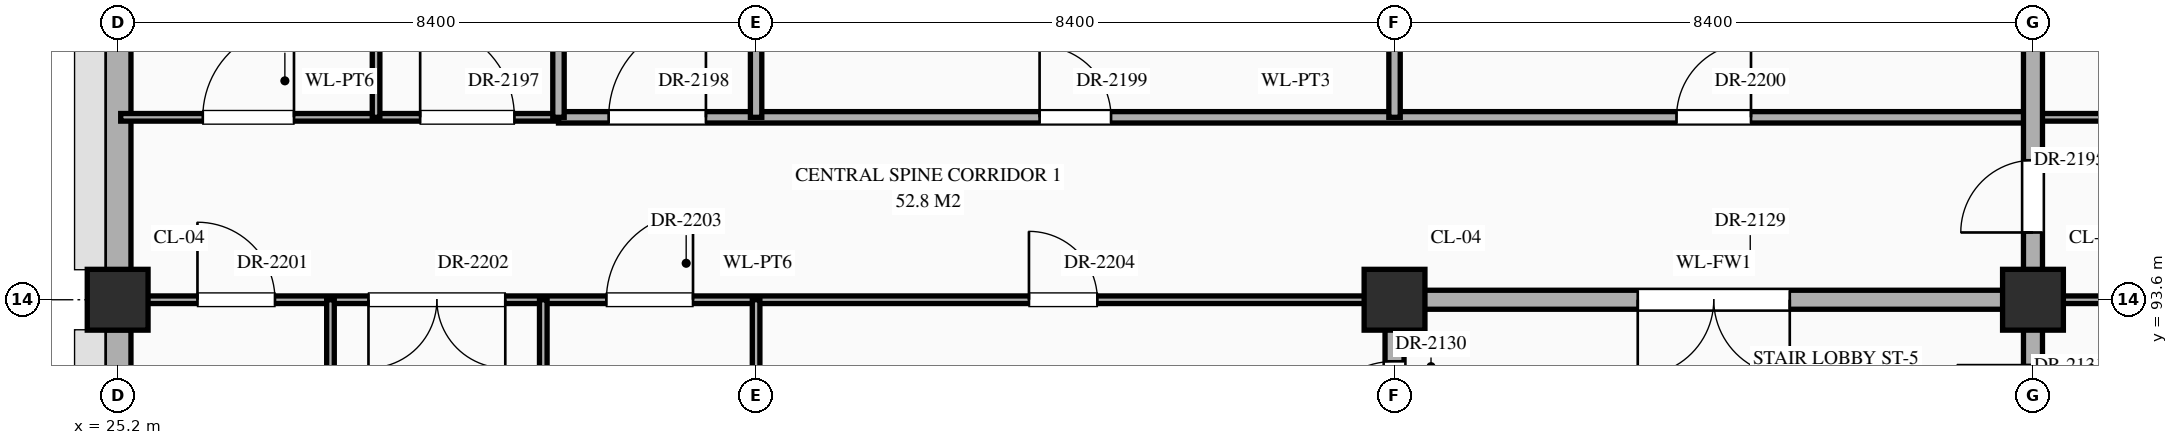
"""IFC4 building model, lengths in metres.
Left out: names, types, materials, properties, quantities, classifications, styles, units other than length and angle.
Written with IfcOpenShell. Run it as: python <this file> out.ifc"""

import sys

from ifc_helpers import new_model, si_unit, direction, frame, frame_2d, origin, origin_2d, place, context, subcontext, project, spatial, rectangle, extrude, element, fill, save


model = new_model("IFC4")
c1 = context("Model", 3, precision=1e-05, world=origin(), true_north=direction((0.0, 1.0)))
c2 = subcontext(c1, "Body", "Model", "MODEL_VIEW")
j1 = project(units=[si_unit("LENGTHUNIT", "METRE"), si_unit("PLANEANGLEUNIT", "RADIAN")], contexts=[c1])
p1 = place(None, origin())
s1 = spatial("IfcSite", under=j1, at=p1, CompositionType="ELEMENT")
p2 = place(p1, origin())
s2 = spatial("IfcBuilding", under=s1, at=p2, CompositionType="ELEMENT")
p3 = place(p2, frame((0.0, 0.0, 26.1)))
s3 = spatial("IfcBuildingStorey", under=s2, at=p3, CompositionType="ELEMENT", Elevation=26.1)
for number, where, z_axis, x_axis in (
    (1, (25.2, 93.6, 0.0), (0.0, 0.0, 1.0), (1.0, 0.0, 0.0)),
    (2, (42.0, 93.6, 0.0), (0.0, 0.0, 1.0), (1.0, 0.0, 0.0)),
    (3, (50.4, 93.6, 0.0), (0.0, 0.0, 1.0), (1.0, 0.0, 0.0)),
):
    element("IfcColumn", number, at=place(p3, frame(where, z_axis=z_axis, x_axis=x_axis)), inside=s3, PredefinedType="COLUMN", context=c2, shape_type="SweptSolid", body=[
        extrude(rectangle(XDim=0.8, YDim=0.8, at=origin_2d()), origin(), (0.0, 0.0, 1.0), 4.5),
    ])
p4 = place(p3, frame((25.2, 86.795, 0.0), z_axis=(0.0, 0.0, 1.0), x_axis=(0.0, 1.0, 0.0)))
e4 = element("IfcWall", 4, at=p4, inside=s3, PredefinedType="STANDARD", context=c2, shape_type="SweptSolid", body=[
    extrude(rectangle(XDim=6.41, YDim=0.35, at=frame_2d((3.205, 0.0))), origin(), (0.0, 0.0, 1.0), 3.59),
])
p5 = place(p4, frame((2.68, 0.0, 0.85)))
e5 = element("IfcOpeningElement", 5, at=p5, cuts=e4, PredefinedType="OPENING", context=c2, shape_type="SweptSolid", body=[
    extrude(rectangle(XDim=1.05, YDim=1.38, at=frame_2d((0.525, 0.69))), frame((0.0, 0.187, 0.0), z_axis=(0.0, -1.0, 0.0), x_axis=(1.0, 0.0, 0.0)), (0.0, 0.0, 1.0), 0.374),
])
p6 = place(p3, frame((25.2, 93.995, 0.0), z_axis=(0.0, 0.0, 1.0), x_axis=(0.0, 1.0, 0.0)))
e6 = element("IfcWall", 6, at=p6, inside=s3, PredefinedType="STANDARD", context=c2, shape_type="SweptSolid", body=[
    extrude(rectangle(XDim=6.41, YDim=0.35, at=frame_2d((3.205, 0.0))), origin(), (0.0, 0.0, 1.0), 3.59),
])
p7 = place(p6, frame((3.83, 0.0, 0.85)))
e7 = element("IfcOpeningElement", 7, at=p7, cuts=e6, PredefinedType="OPENING", context=c2, shape_type="SweptSolid", body=[
    extrude(rectangle(XDim=1.35, YDim=1.56, at=frame_2d((0.675, 0.78))), frame((0.0, 0.187, 0.0), z_axis=(0.0, -1.0, 0.0), x_axis=(1.0, 0.0, 0.0)), (0.0, 0.0, 1.0), 0.374),
])
p8 = place(p3, frame((25.24, 93.6, 0.0), z_axis=(0.0, 0.0, 1.0), x_axis=(1.0, 0.0, 0.0)))
e8 = element("IfcWall", 8, at=p8, inside=s3, PredefinedType="STANDARD", context=c2, shape_type="SweptSolid", body=[
    extrude(rectangle(XDim=16.76, YDim=0.1, at=frame_2d((8.38, 0.0))), origin(), (0.0, 0.0, 1.0), 3.19),
])
p9 = place(p8, frame((1.01, 0.0, 0.0)))
e9 = element("IfcOpeningElement", 9, at=p9, cuts=e8, PredefinedType="OPENING", context=c2, shape_type="SweptSolid", body=[
    extrude(rectangle(XDim=1.02, YDim=2.4, at=frame_2d((0.51, 1.2))), frame((0.0, 0.062, 0.0), z_axis=(0.0, -1.0, 0.0), x_axis=(1.0, 0.0, 0.0)), (0.0, 0.0, 1.0), 0.124),
])
p10 = place(p8, frame((3.26, 0.0, 0.0)))
e10 = element("IfcOpeningElement", 10, at=p10, cuts=e8, PredefinedType="OPENING", context=c2, shape_type="SweptSolid", body=[
    extrude(rectangle(XDim=1.8, YDim=2.5, at=frame_2d((0.9, 1.25))), frame((0.0, 0.062, 0.0), z_axis=(0.0, -1.0, 0.0), x_axis=(1.0, 0.0, 0.0)), (0.0, 0.0, 1.0), 0.124),
])
p11 = place(p8, frame((6.39, 0.0, 0.0)))
e11 = element("IfcOpeningElement", 11, at=p11, cuts=e8, PredefinedType="OPENING", context=c2, shape_type="SweptSolid", body=[
    extrude(rectangle(XDim=1.14, YDim=2.4, at=frame_2d((0.57, 1.2))), frame((0.0, 0.062, 0.0), z_axis=(0.0, -1.0, 0.0), x_axis=(1.0, 0.0, 0.0)), (0.0, 0.0, 1.0), 0.124),
])
p12 = place(p8, frame((11.95, 0.0, 0.0)))
e12 = element("IfcOpeningElement", 12, at=p12, cuts=e8, PredefinedType="OPENING", context=c2, shape_type="SweptSolid", body=[
    extrude(rectangle(XDim=0.9, YDim=2.15, at=frame_2d((0.45, 1.075))), frame((0.0, 0.062, 0.0), z_axis=(0.0, -1.0, 0.0), x_axis=(1.0, 0.0, 0.0)), (0.0, 0.0, 1.0), 0.124),
])
p13 = place(p3, frame((42.0, 93.6, 0.0), z_axis=(0.0, 0.0, 1.0), x_axis=(1.0, 0.0, 0.0)))
e13 = element("IfcWall", 13, at=p13, inside=s3, PredefinedType="STANDARD", context=c2, shape_type="SweptSolid", body=[
    extrude(rectangle(XDim=8.4, YDim=0.25, at=frame_2d((4.2, 0.0))), origin(), (0.0, 0.0, 1.0), 3.39),
])
p14 = place(p13, frame((3.2, 0.0, 0.0)))
e14 = element("IfcOpeningElement", 14, at=p14, cuts=e13, PredefinedType="OPENING", context=c2, shape_type="SweptSolid", body=[
    extrude(rectangle(XDim=2.0, YDim=2.4, at=frame_2d((1.0, 1.2))), frame((0.0, 0.137, 0.0), z_axis=(0.0, -1.0, 0.0), x_axis=(1.0, 0.0, 0.0)), (0.0, 0.0, 1.0), 0.274),
])
p15 = place(p3, frame((50.4, 93.6, 0.0), z_axis=(0.0, 0.0, 1.0), x_axis=(1.0, 0.0, 0.0)))
e15 = element("IfcWall", 15, at=p15, inside=s3, PredefinedType="STANDARD", context=c2, shape_type="SweptSolid", body=[
    extrude(rectangle(XDim=8.4, YDim=0.1, at=frame_2d((4.2, 0.0))), origin(), (0.0, 0.0, 1.0), 3.39),
])
p16 = place(p15, frame((0.98, 0.0, 0.0)))
e16 = element("IfcOpeningElement", 16, at=p16, cuts=e15, PredefinedType="OPENING", context=c2, shape_type="SweptSolid", body=[
    extrude(rectangle(XDim=1.16, YDim=2.3, at=frame_2d((0.58, 1.15))), frame((0.0, 0.062, 0.0), z_axis=(0.0, -1.0, 0.0), x_axis=(1.0, 0.0, 0.0)), (0.0, 0.0, 1.0), 0.124),
])
p17 = place(p15, frame((3.6, 0.0, 0.0)))
e17 = element("IfcOpeningElement", 17, at=p17, cuts=e15, PredefinedType="OPENING", context=c2, shape_type="SweptSolid", body=[
    extrude(rectangle(XDim=1.2, YDim=2.35, at=frame_2d((0.6, 1.175))), frame((0.0, 0.062, 0.0), z_axis=(0.0, -1.0, 0.0), x_axis=(1.0, 0.0, 0.0)), (0.0, 0.0, 1.0), 0.124),
])
p18 = place(p15, frame((6.22, 0.0, 0.0)))
e18 = element("IfcOpeningElement", 18, at=p18, cuts=e15, PredefinedType="OPENING", context=c2, shape_type="SweptSolid", body=[
    extrude(rectangle(XDim=1.24, YDim=2.3, at=frame_2d((0.62, 1.15))), frame((0.0, 0.062, 0.0), z_axis=(0.0, -1.0, 0.0), x_axis=(1.0, 0.0, 0.0)), (0.0, 0.0, 1.0), 0.124),
])
p19 = place(p3, frame((25.24, 96.0, 0.0), z_axis=(0.0, 0.0, 1.0), x_axis=(1.0, 0.0, 0.0)))
e19 = element("IfcWall", 19, at=p19, inside=s3, PredefinedType="STANDARD", context=c2, shape_type="SweptSolid", body=[
    extrude(rectangle(XDim=5.76, YDim=0.1, at=frame_2d((2.88, 0.0))), origin(), (0.0, 0.0, 1.0), 4.24),
])
p20 = place(p19, frame((1.08, 0.0, 0.0)))
e20 = element("IfcOpeningElement", 20, at=p20, cuts=e19, PredefinedType="OPENING", context=c2, shape_type="SweptSolid", body=[
    extrude(rectangle(XDim=1.2, YDim=2.35, at=frame_2d((0.6, 1.175))), frame((0.0, 0.062, 0.0), z_axis=(0.0, -1.0, 0.0), x_axis=(1.0, 0.0, 0.0)), (0.0, 0.0, 1.0), 0.124),
])
p21 = place(p19, frame((3.94, 0.0, 0.0)))
e21 = element("IfcOpeningElement", 21, at=p21, cuts=e19, PredefinedType="OPENING", context=c2, shape_type="SweptSolid", body=[
    extrude(rectangle(XDim=1.24, YDim=2.3, at=frame_2d((0.62, 1.15))), frame((0.0, 0.062, 0.0), z_axis=(0.0, -1.0, 0.0), x_axis=(1.0, 0.0, 0.0)), (0.0, 0.0, 1.0), 0.124),
])
p22 = place(p3, frame((31.0, 96.0, 0.0), z_axis=(0.0, 0.0, 1.0), x_axis=(1.0, 0.0, 0.0)))
e22 = element("IfcWall", 22, at=p22, inside=s3, PredefinedType="STANDARD", context=c2, shape_type="SweptSolid", body=[
    extrude(rectangle(XDim=19.4, YDim=0.15, at=frame_2d((9.7, 0.0))), origin(), (0.0, 0.0, 1.0), 4.24),
])
p23 = place(p22, frame((0.66, 0.0, 0.0)))
e23 = element("IfcOpeningElement", 23, at=p23, cuts=e22, PredefinedType="OPENING", context=c2, shape_type="SweptSolid", body=[
    extrude(rectangle(XDim=1.28, YDim=2.35, at=frame_2d((0.64, 1.175))), frame((0.0, 0.087, 0.0), z_axis=(0.0, -1.0, 0.0), x_axis=(1.0, 0.0, 0.0)), (0.0, 0.0, 1.0), 0.174),
])
p24 = place(p22, frame((6.33, 0.0, 0.0)))
e24 = element("IfcOpeningElement", 24, at=p24, cuts=e22, PredefinedType="OPENING", context=c2, shape_type="SweptSolid", body=[
    extrude(rectangle(XDim=0.94, YDim=2.3, at=frame_2d((0.47, 1.15))), frame((0.0, 0.087, 0.0), z_axis=(0.0, -1.0, 0.0), x_axis=(1.0, 0.0, 0.0)), (0.0, 0.0, 1.0), 0.174),
])
p25 = place(p22, frame((14.71, 0.0, 0.0)))
e25 = element("IfcOpeningElement", 25, at=p25, cuts=e22, PredefinedType="OPENING", context=c2, shape_type="SweptSolid", body=[
    extrude(rectangle(XDim=0.98, YDim=2.35, at=frame_2d((0.49, 1.175))), frame((0.0, 0.087, 0.0), z_axis=(0.0, -1.0, 0.0), x_axis=(1.0, 0.0, 0.0)), (0.0, 0.0, 1.0), 0.174),
])
p26 = place(p3, frame((50.4, 96.0, 0.0), z_axis=(0.0, 0.0, 1.0), x_axis=(1.0, 0.0, 0.0)))
e26 = element("IfcWall", 26, at=p26, inside=s3, PredefinedType="STANDARD", context=c2, shape_type="SweptSolid", body=[
    extrude(rectangle(XDim=5.8, YDim=0.1, at=frame_2d((2.9, 0.0))), origin(), (0.0, 0.0, 1.0), 4.24),
])
p27 = place(p26, frame((1.24, 0.0, 0.0)))
e27 = element("IfcOpeningElement", 27, at=p27, cuts=e26, PredefinedType="OPENING", context=c2, shape_type="SweptSolid", body=[
    extrude(rectangle(XDim=0.92, YDim=2.15, at=frame_2d((0.46, 1.075))), frame((0.0, 0.062, 0.0), z_axis=(0.0, -1.0, 0.0), x_axis=(1.0, 0.0, 0.0)), (0.0, 0.0, 1.0), 0.124),
])
p28 = place(p26, frame((4.12, 0.0, 0.0)))
e28 = element("IfcOpeningElement", 28, at=p28, cuts=e26, PredefinedType="OPENING", context=c2, shape_type="SweptSolid", body=[
    extrude(rectangle(XDim=0.96, YDim=2.2, at=frame_2d((0.48, 1.1))), frame((0.0, 0.062, 0.0), z_axis=(0.0, -1.0, 0.0), x_axis=(1.0, 0.0, 0.0)), (0.0, 0.0, 1.0), 0.124),
])
p29 = place(p3, frame((28.0, 86.4, 0.0), z_axis=(0.0, 0.0, 1.0), x_axis=(0.0, 1.0, 0.0)))
e29 = element("IfcWall", 29, at=p29, inside=s3, PredefinedType="STANDARD", context=c2, shape_type="SweptSolid", body=[
    extrude(rectangle(XDim=7.2, YDim=0.1, at=frame_2d((3.6, 0.0))), origin(), (0.0, 0.0, 1.0), 4.24),
])
p30 = place(p29, frame((2.96, 0.0, 0.0)))
e30 = element("IfcOpeningElement", 30, at=p30, cuts=e29, PredefinedType="OPENING", context=c2, shape_type="SweptSolid", body=[
    extrude(rectangle(XDim=1.28, YDim=2.35, at=frame_2d((0.64, 1.175))), frame((0.0, 0.062, 0.0), z_axis=(0.0, -1.0, 0.0), x_axis=(1.0, 0.0, 0.0)), (0.0, 0.0, 1.0), 0.124),
])
p31 = place(p3, frame((28.6, 96.0, 0.0), z_axis=(0.0, 0.0, 1.0), x_axis=(0.0, 1.0, 0.0)))
e31 = element("IfcWall", 31, at=p31, inside=s3, PredefinedType="STANDARD", context=c2, shape_type="SweptSolid", body=[
    extrude(rectangle(XDim=4.8, YDim=0.1, at=frame_2d((2.4, 0.0))), origin(), (0.0, 0.0, 1.0), 4.24),
])
p32 = place(p31, frame((1.97, 0.0, 0.0)))
e32 = element("IfcOpeningElement", 32, at=p32, cuts=e31, PredefinedType="OPENING", context=c2, shape_type="SweptSolid", body=[
    extrude(rectangle(XDim=0.86, YDim=2.1, at=frame_2d((0.43, 1.05))), frame((0.0, 0.062, 0.0), z_axis=(0.0, -1.0, 0.0), x_axis=(1.0, 0.0, 0.0)), (0.0, 0.0, 1.0), 0.124),
])
p33 = place(p3, frame((30.8, 86.4, 0.0), z_axis=(0.0, 0.0, 1.0), x_axis=(0.0, 1.0, 0.0)))
e33 = element("IfcWall", 33, at=p33, inside=s3, PredefinedType="STANDARD", context=c2, shape_type="SweptSolid", body=[
    extrude(rectangle(XDim=7.2, YDim=0.1, at=frame_2d((3.6, 0.0))), origin(), (0.0, 0.0, 1.0), 4.24),
])
p34 = place(p33, frame((3.11, 0.0, 0.0)))
e34 = element("IfcOpeningElement", 34, at=p34, cuts=e33, PredefinedType="OPENING", context=c2, shape_type="SweptSolid", body=[
    extrude(rectangle(XDim=0.98, YDim=2.35, at=frame_2d((0.49, 1.175))), frame((0.0, 0.062, 0.0), z_axis=(0.0, -1.0, 0.0), x_axis=(1.0, 0.0, 0.0)), (0.0, 0.0, 1.0), 0.124),
])
p35 = place(p3, frame((31.0, 96.0, 0.0), z_axis=(0.0, 0.0, 1.0), x_axis=(0.0, 1.0, 0.0)))
e35 = element("IfcWall", 35, at=p35, inside=s3, PredefinedType="STANDARD", context=c2, shape_type="SweptSolid", body=[
    extrude(rectangle(XDim=4.8, YDim=0.15, at=frame_2d((2.4, 0.0))), origin(), (0.0, 0.0, 1.0), 4.24),
])
p36 = place(p35, frame((1.94, 0.0, 0.0)))
e36 = element("IfcOpeningElement", 36, at=p36, cuts=e35, PredefinedType="OPENING", context=c2, shape_type="SweptSolid", body=[
    extrude(rectangle(XDim=0.92, YDim=2.15, at=frame_2d((0.46, 1.075))), frame((0.0, 0.087, 0.0), z_axis=(0.0, -1.0, 0.0), x_axis=(1.0, 0.0, 0.0)), (0.0, 0.0, 1.0), 0.174),
])
p37 = place(p3, frame((33.6, 86.4, 0.0), z_axis=(0.0, 0.0, 1.0), x_axis=(0.0, 1.0, 0.0)))
e37 = element("IfcWall", 37, at=p37, inside=s3, PredefinedType="STANDARD", context=c2, shape_type="SweptSolid", body=[
    extrude(rectangle(XDim=7.2, YDim=0.1, at=frame_2d((3.6, 0.0))), origin(), (0.0, 0.0, 1.0), 4.24),
])
p38 = place(p3, frame((33.6, 96.0, 0.0), z_axis=(0.0, 0.0, 1.0), x_axis=(0.0, 1.0, 0.0)))
e38 = element("IfcWall", 38, at=p38, inside=s3, PredefinedType="STANDARD", context=c2, shape_type="SweptSolid", body=[
    extrude(rectangle(XDim=4.8, YDim=0.15, at=frame_2d((2.4, 0.0))), origin(), (0.0, 0.0, 1.0), 4.24),
])
p39 = place(p3, frame((42.0, 91.2, 0.0), z_axis=(0.0, 0.0, 1.0), x_axis=(0.0, 1.0, 0.0)))
e39 = element("IfcWall", 39, at=p39, inside=s3, PredefinedType="STANDARD", context=c2, shape_type="SweptSolid", body=[
    extrude(rectangle(XDim=2.4, YDim=0.25, at=frame_2d((1.2, 0.0))), origin(), (0.0, 0.0, 1.0), 3.49),
])
p40 = place(p39, frame((0.49, 0.0, 0.0)))
e40 = element("IfcOpeningElement", 40, at=p40, cuts=e39, PredefinedType="OPENING", context=c2, shape_type="SweptSolid", body=[
    extrude(rectangle(XDim=1.1, YDim=2.2, at=frame_2d((0.55, 1.1))), frame((0.0, 0.137, 0.0), z_axis=(0.0, -1.0, 0.0), x_axis=(1.0, 0.0, 0.0)), (0.0, 0.0, 1.0), 0.274),
])
p41 = place(p3, frame((42.0, 96.0, 0.0), z_axis=(0.0, 0.0, 1.0), x_axis=(0.0, 1.0, 0.0)))
e41 = element("IfcWall", 41, at=p41, inside=s3, PredefinedType="STANDARD", context=c2, shape_type="SweptSolid", body=[
    extrude(rectangle(XDim=4.8, YDim=0.15, at=frame_2d((2.4, 0.0))), origin(), (0.0, 0.0, 1.0), 3.49),
])
p42 = place(p3, frame((50.4, 91.2, 0.0), z_axis=(0.0, 0.0, 1.0), x_axis=(0.0, 1.0, 0.0)))
e42 = element("IfcWall", 42, at=p42, inside=s3, PredefinedType="STANDARD", context=c2, shape_type="SweptSolid", body=[
    extrude(rectangle(XDim=13.2, YDim=0.25, at=frame_2d((6.6, 0.0))), origin(), (0.0, 0.0, 1.0), 3.49),
])
p43 = place(p42, frame((0.54, 0.0, 0.0)))
e43 = element("IfcOpeningElement", 43, at=p43, cuts=e42, PredefinedType="OPENING", context=c2, shape_type="SweptSolid", body=[
    extrude(rectangle(XDim=1.0, YDim=2.2, at=frame_2d((0.5, 1.1))), frame((0.0, 0.137, 0.0), z_axis=(0.0, -1.0, 0.0), x_axis=(1.0, 0.0, 0.0)), (0.0, 0.0, 1.0), 0.274),
])
p44 = place(p42, frame((10.41, 0.0, 0.0)))
e44 = element("IfcOpeningElement", 44, at=p44, cuts=e42, PredefinedType="OPENING", context=c2, shape_type="SweptSolid", body=[
    extrude(rectangle(XDim=1.1, YDim=2.2, at=frame_2d((0.55, 1.1))), frame((0.0, 0.137, 0.0), z_axis=(0.0, -1.0, 0.0), x_axis=(1.0, 0.0, 0.0)), (0.0, 0.0, 1.0), 0.274),
])
p45 = place(p42, frame((3.285, 0.0, 0.0)))
e45 = element("IfcOpeningElement", 45, at=p45, cuts=e42, PredefinedType="OPENING", context=c2, shape_type="SweptSolid", body=[
    extrude(rectangle(XDim=0.95, YDim=2.15, at=frame_2d((0.475, 1.075))), frame((0.0, 0.137, 0.0), z_axis=(0.0, -1.0, 0.0), x_axis=(1.0, 0.0, 0.0)), (0.0, 0.0, 1.0), 0.274),
])
p46 = place(p14, frame((2.0, 0.0, 0.0), z_axis=(0.0, 0.0, 1.0), x_axis=(-1.0, 0.0, 0.0)))
e46 = element("IfcDoor", 46, at=p46, inside=s3, OperationType="DOUBLE_DOOR_SINGLE_SWING", PredefinedType="DOOR", context=c2, shape_type="SweptSolid", body=[
    extrude(rectangle(XDim=2.0, YDim=2.4, at=frame_2d((1.0, 1.2))), frame((0.0, 0.025, 0.0), z_axis=(0.0, -1.0, 0.0), x_axis=(1.0, 0.0, 0.0)), (0.0, 0.0, 1.0), 0.05),
])
fill(e14, e46)
p47 = place(p40, origin())
e47 = element("IfcDoor", 47, at=p47, inside=s3, OperationType="SINGLE_SWING_LEFT", PredefinedType="DOOR", context=c2, shape_type="SweptSolid", body=[
    extrude(rectangle(XDim=1.1, YDim=2.2, at=frame_2d((0.55, 1.1))), frame((0.0, 0.025, 0.0), z_axis=(0.0, -1.0, 0.0), x_axis=(1.0, 0.0, 0.0)), (0.0, 0.0, 1.0), 0.05),
])
fill(e40, e47)
p48 = place(p45, origin())
e48 = element("IfcDoor", 48, at=p48, inside=s3, OperationType="SINGLE_SWING_LEFT", PredefinedType="DOOR", context=c2, shape_type="SweptSolid", body=[
    extrude(rectangle(XDim=0.95, YDim=2.15, at=frame_2d((0.475, 1.075))), frame((0.0, 0.025, 0.0), z_axis=(0.0, -1.0, 0.0), x_axis=(1.0, 0.0, 0.0)), (0.0, 0.0, 1.0), 0.05),
])
fill(e45, e48)
p49 = place(p20, origin())
e49 = element("IfcDoor", 49, at=p49, inside=s3, OperationType="SINGLE_SWING_RIGHT", PredefinedType="DOOR", context=c2, shape_type="SweptSolid", body=[
    extrude(rectangle(XDim=1.2, YDim=2.35, at=frame_2d((0.6, 1.175))), frame((0.0, 0.025, 0.0), z_axis=(0.0, -1.0, 0.0), x_axis=(1.0, 0.0, 0.0)), (0.0, 0.0, 1.0), 0.05),
])
fill(e20, e49)
p50 = place(p21, origin())
e50 = element("IfcDoor", 50, at=p50, inside=s3, OperationType="SINGLE_SWING_LEFT", PredefinedType="DOOR", context=c2, shape_type="SweptSolid", body=[
    extrude(rectangle(XDim=1.24, YDim=2.3, at=frame_2d((0.62, 1.15))), frame((0.0, 0.025, 0.0), z_axis=(0.0, -1.0, 0.0), x_axis=(1.0, 0.0, 0.0)), (0.0, 0.0, 1.0), 0.05),
])
fill(e21, e50)
p51 = place(p23, origin())
e51 = element("IfcDoor", 51, at=p51, inside=s3, OperationType="SINGLE_SWING_RIGHT", PredefinedType="DOOR", context=c2, shape_type="SweptSolid", body=[
    extrude(rectangle(XDim=1.28, YDim=2.35, at=frame_2d((0.64, 1.175))), frame((0.0, 0.025, 0.0), z_axis=(0.0, -1.0, 0.0), x_axis=(1.0, 0.0, 0.0)), (0.0, 0.0, 1.0), 0.05),
])
fill(e23, e51)
p52 = place(p24, origin())
e52 = element("IfcDoor", 52, at=p52, inside=s3, OperationType="SINGLE_SWING_LEFT", PredefinedType="DOOR", context=c2, shape_type="SweptSolid", body=[
    extrude(rectangle(XDim=0.94, YDim=2.3, at=frame_2d((0.47, 1.15))), frame((0.0, 0.025, 0.0), z_axis=(0.0, -1.0, 0.0), x_axis=(1.0, 0.0, 0.0)), (0.0, 0.0, 1.0), 0.05),
])
fill(e24, e52)
p53 = place(p25, origin())
e53 = element("IfcDoor", 53, at=p53, inside=s3, OperationType="SINGLE_SWING_RIGHT", PredefinedType="DOOR", context=c2, shape_type="SweptSolid", body=[
    extrude(rectangle(XDim=0.98, YDim=2.35, at=frame_2d((0.49, 1.175))), frame((0.0, 0.025, 0.0), z_axis=(0.0, -1.0, 0.0), x_axis=(1.0, 0.0, 0.0)), (0.0, 0.0, 1.0), 0.05),
])
fill(e25, e53)
p54 = place(p9, origin())
e54 = element("IfcDoor", 54, at=p54, inside=s3, OperationType="SINGLE_SWING_LEFT", PredefinedType="DOOR", context=c2, shape_type="SweptSolid", body=[
    extrude(rectangle(XDim=1.02, YDim=2.4, at=frame_2d((0.51, 1.2))), frame((0.0, 0.025, 0.0), z_axis=(0.0, -1.0, 0.0), x_axis=(1.0, 0.0, 0.0)), (0.0, 0.0, 1.0), 0.05),
])
fill(e9, e54)
p55 = place(p10, frame((1.8, 0.0, 0.0), z_axis=(0.0, 0.0, 1.0), x_axis=(-1.0, 0.0, 0.0)))
e55 = element("IfcDoor", 55, at=p55, inside=s3, OperationType="DOUBLE_DOOR_SINGLE_SWING", PredefinedType="DOOR", context=c2, shape_type="SweptSolid", body=[
    extrude(rectangle(XDim=1.8, YDim=2.5, at=frame_2d((0.9, 1.25))), frame((0.0, 0.025, 0.0), z_axis=(0.0, -1.0, 0.0), x_axis=(1.0, 0.0, 0.0)), (0.0, 0.0, 1.0), 0.05),
])
fill(e10, e55)
p56 = place(p11, origin())
e56 = element("IfcDoor", 56, at=p56, inside=s3, OperationType="SINGLE_SWING_RIGHT", PredefinedType="DOOR", context=c2, shape_type="SweptSolid", body=[
    extrude(rectangle(XDim=1.14, YDim=2.4, at=frame_2d((0.57, 1.2))), frame((0.0, 0.025, 0.0), z_axis=(0.0, -1.0, 0.0), x_axis=(1.0, 0.0, 0.0)), (0.0, 0.0, 1.0), 0.05),
])
fill(e11, e56)
p57 = place(p12, origin())
e57 = element("IfcDoor", 57, at=p57, inside=s3, OperationType="SINGLE_SWING_LEFT", PredefinedType="DOOR", context=c2, shape_type="SweptSolid", body=[
    extrude(rectangle(XDim=0.9, YDim=2.15, at=frame_2d((0.45, 1.075))), frame((0.0, 0.025, 0.0), z_axis=(0.0, -1.0, 0.0), x_axis=(1.0, 0.0, 0.0)), (0.0, 0.0, 1.0), 0.05),
])
fill(e12, e57)
save(model, sys.argv[1])
